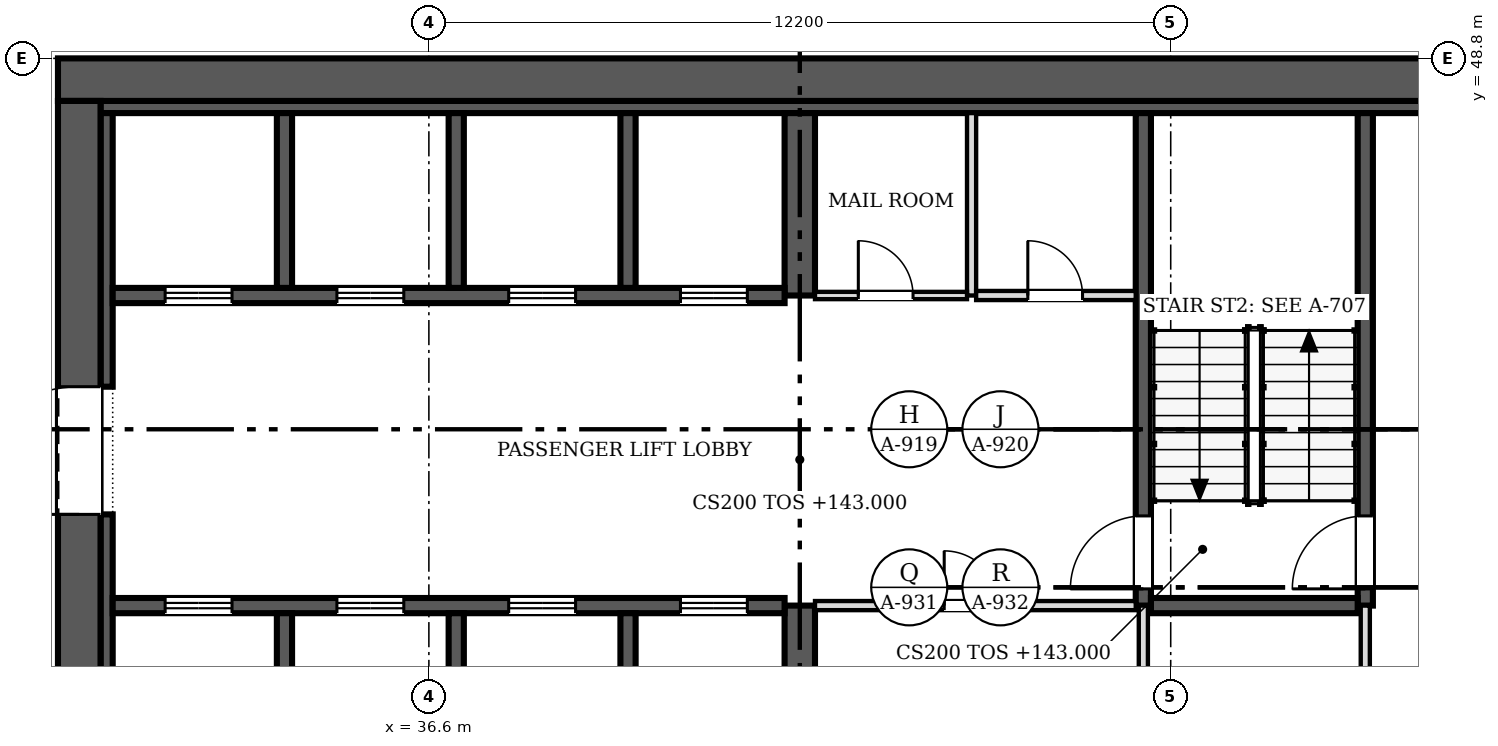
"""IFC4 building model, lengths in metres.
Left out: names, types, materials, properties, quantities, classifications, styles, units other than length and angle.
Written with IfcOpenShell. Run it as: python <this file> out.ifc"""

import sys

from ifc_helpers import new_model, si_unit, direction, frame, frame_2d, origin, place, context, subcontext, project, spatial, rectangle, extrude, source, transform, mapped, element, fill, save


model = new_model("IFC4")
c1 = context("Model", 3, precision=1e-05, world=origin(), true_north=direction((0.0, 1.0)))
c2 = subcontext(c1, "Body", "Model", "MODEL_VIEW")
j1 = project(units=[si_unit("LENGTHUNIT", "METRE"), si_unit("PLANEANGLEUNIT", "RADIAN")], contexts=[c1])
p1 = place(None, origin())
s1 = spatial("IfcSite", under=j1, at=p1, CompositionType="ELEMENT")
p2 = place(p1, origin())
s2 = spatial("IfcBuilding", under=s1, at=p2, CompositionType="ELEMENT")
p3 = place(p2, frame((0.0, 0.0, 143.0)))
s3 = spatial("IfcBuildingStorey", under=s2, at=p3, CompositionType="ELEMENT", Elevation=143.0)
p4 = place(p3, frame((30.85, 25.1, 0.0), z_axis=(0.0, 0.0, 1.0), x_axis=(0.0, 1.0, 0.0)))
e1 = element("IfcWall", 1, at=p4, inside=s3, PredefinedType="SHEAR", context=c2, shape_type="SweptSolid", body=[
    extrude(rectangle(XDim=23.0, YDim=0.7, at=frame_2d((11.5, 0.0))), origin(), (0.0, 0.0, 1.0), 3.8),
])
m1 = source(origin(), c2, "Body", "SweptSolid", [
    extrude(rectangle(XDim=2.1, YDim=2.4, at=frame_2d((1.05, 1.2))), frame((0.0, 0.36, 0.0), z_axis=(0.0, -1.0, 0.0), x_axis=(1.0, 0.0, 0.0)), (0.0, 0.0, 1.0), 0.72),
])
p5 = place(p4, frame((4.7, 0.0, 0.0)))
e2 = element("IfcOpeningElement", 2, at=p5, cuts=e1, PredefinedType="OPENING", context=c2, shape_type="MappedRepresentation", body=[
    mapped(m1, transform((0.0, 0.0, 0.0), scale=1.0)),
])
p6 = place(p4, frame((16.2, 0.0, 0.0)))
e3 = element("IfcOpeningElement", 3, at=p6, cuts=e1, PredefinedType="OPENING", context=c2, shape_type="MappedRepresentation", body=[
    mapped(m1, transform((0.0, 0.0, 0.0), scale=1.0)),
])
p7 = place(p3, frame((30.5, 48.45, 0.0), z_axis=(0.0, 0.0, 1.0), x_axis=(1.0, 0.0, 0.0)))
e4 = element("IfcWall", 4, at=p7, inside=s3, PredefinedType="SHEAR", context=c2, shape_type="SweptSolid", body=[
    extrude(rectangle(XDim=24.4, YDim=0.7, at=frame_2d((12.2, 0.0))), origin(), (0.0, 0.0, 1.0), 3.8),
])
p8 = place(p3, frame((31.2, 48.0, 0.0), z_axis=(0.0, 0.0, 1.0), x_axis=(1.0, 0.0, 0.0)))
e5 = element("IfcWall", 5, at=p8, inside=s3, PredefinedType="SOLIDWALL", context=c2, shape_type="SweptSolid", body=[
    extrude(rectangle(XDim=23.0, YDim=0.2, at=frame_2d((11.5, 0.0))), origin(), (0.0, 0.0, 1.0), 3.8),
])
p9 = place(p3, frame((31.3, 31.9, 0.0), z_axis=(0.0, 0.0, 1.0), x_axis=(0.0, 1.0, 0.0)))
e6 = element("IfcWall", 6, at=p9, inside=s3, PredefinedType="SOLIDWALL", context=c2, shape_type="SweptSolid", body=[
    extrude(rectangle(XDim=9.4, YDim=0.2, at=frame_2d((4.7, 0.0))), origin(), (0.0, 0.0, 1.0), 3.8),
])
p10 = place(p3, frame((31.3, 43.4, 0.0), z_axis=(0.0, 0.0, 1.0), x_axis=(0.0, 1.0, 0.0)))
e7 = element("IfcWall", 7, at=p10, inside=s3, PredefinedType="SOLIDWALL", context=c2, shape_type="SweptSolid", body=[
    extrude(rectangle(XDim=4.5, YDim=0.2, at=frame_2d((2.25, 0.0))), origin(), (0.0, 0.0, 1.0), 3.8),
])
p11 = place(p3, frame((42.7, 36.85, 0.0), z_axis=(0.0, 0.0, 1.0), x_axis=(0.0, 1.0, 0.0)))
e8 = element("IfcWall", 8, at=p11, inside=s3, PredefinedType="SHEAR", context=c2, shape_type="SweptSolid", body=[
    extrude(rectangle(XDim=2.95, YDim=0.5, at=frame_2d((1.475, 0.0))), origin(), (0.0, 0.0, 1.0), 3.8),
])
p12 = place(p3, frame((42.7, 44.9, 0.0), z_axis=(0.0, 0.0, 1.0), x_axis=(0.0, 1.0, 0.0)))
e9 = element("IfcWall", 9, at=p12, inside=s3, PredefinedType="SHEAR", context=c2, shape_type="SweptSolid", body=[
    extrude(rectangle(XDim=3.0, YDim=0.5, at=frame_2d((1.5, 0.0))), origin(), (0.0, 0.0, 1.0), 3.8),
])
p13 = place(p3, frame((31.4, 39.8, 0.0), z_axis=(0.0, 0.0, 1.0), x_axis=(1.0, 0.0, 0.0)))
e10 = element("IfcWall", 10, at=p13, inside=s3, PredefinedType="SOLIDWALL", context=c2, shape_type="SweptSolid", body=[
    extrude(rectangle(XDim=11.05, YDim=0.25, at=frame_2d((5.525, 0.0))), origin(), (0.0, 0.0, 1.0), 3.8),
])
m2 = source(origin(), c2, "Body", "SweptSolid", [
    extrude(rectangle(XDim=1.1, YDim=2.1, at=frame_2d((0.55, 1.05))), frame((0.0, 0.135, 0.0), z_axis=(0.0, -1.0, 0.0), x_axis=(1.0, 0.0, 0.0)), (0.0, 0.0, 1.0), 0.27),
])
p14 = place(p13, frame((0.863, 0.0, 0.0)))
e11 = element("IfcOpeningElement", 11, at=p14, cuts=e10, PredefinedType="OPENING", context=c2, shape_type="MappedRepresentation", body=[
    mapped(m2, transform((0.0, 0.0, 0.0), scale=1.0)),
])
p15 = place(p13, frame((3.688, 0.0, 0.0)))
e12 = element("IfcOpeningElement", 12, at=p15, cuts=e10, PredefinedType="OPENING", context=c2, shape_type="MappedRepresentation", body=[
    mapped(m2, transform((0.0, 0.0, 0.0), scale=1.0)),
])
p16 = place(p13, frame((6.512, 0.0, 0.0)))
e13 = element("IfcOpeningElement", 13, at=p16, cuts=e10, PredefinedType="OPENING", context=c2, shape_type="MappedRepresentation", body=[
    mapped(m2, transform((0.0, 0.0, 0.0), scale=1.0)),
])
p17 = place(p13, frame((9.337, 0.0, 0.0)))
e14 = element("IfcOpeningElement", 14, at=p17, cuts=e10, PredefinedType="OPENING", context=c2, shape_type="MappedRepresentation", body=[
    mapped(m2, transform((0.0, 0.0, 0.0), scale=1.0)),
])
p18 = place(p3, frame((42.45, 44.9, 0.0), z_axis=(0.0, 0.0, 1.0), x_axis=(-1.0, 0.0, 0.0)))
e15 = element("IfcWall", 15, at=p18, inside=s3, PredefinedType="SOLIDWALL", context=c2, shape_type="SweptSolid", body=[
    extrude(rectangle(XDim=11.05, YDim=0.25, at=frame_2d((5.525, 0.0))), origin(), (0.0, 0.0, 1.0), 3.8),
])
p19 = place(p18, frame((9.087, 0.0, 0.0)))
e16 = element("IfcOpeningElement", 16, at=p19, cuts=e15, PredefinedType="OPENING", context=c2, shape_type="MappedRepresentation", body=[
    mapped(m2, transform((0.0, 0.0, 0.0), scale=1.0)),
])
p20 = place(p18, frame((6.262, 0.0, 0.0)))
e17 = element("IfcOpeningElement", 17, at=p20, cuts=e15, PredefinedType="OPENING", context=c2, shape_type="MappedRepresentation", body=[
    mapped(m2, transform((0.0, 0.0, 0.0), scale=1.0)),
])
p21 = place(p18, frame((3.438, 0.0, 0.0)))
e18 = element("IfcOpeningElement", 18, at=p21, cuts=e15, PredefinedType="OPENING", context=c2, shape_type="MappedRepresentation", body=[
    mapped(m2, transform((0.0, 0.0, 0.0), scale=1.0)),
])
p22 = place(p18, frame((0.613, 0.0, 0.0)))
e19 = element("IfcOpeningElement", 19, at=p22, cuts=e15, PredefinedType="OPENING", context=c2, shape_type="MappedRepresentation", body=[
    mapped(m2, transform((0.0, 0.0, 0.0), scale=1.0)),
])
p23 = place(p3, frame((48.35, 47.9, 0.0), z_axis=(0.0, 0.0, 1.0), x_axis=(0.0, -1.0, 0.0)))
e20 = element("IfcWall", 20, at=p23, inside=s3, PredefinedType="SOLIDWALL", context=c2, shape_type="SweptSolid", body=[
    extrude(rectangle(XDim=8.1, YDim=0.25, at=frame_2d((4.05, 0.0))), origin(), (0.0, 0.0, 1.0), 3.8),
])
m3 = source(origin(), c2, "Body", "SweptSolid", [
    extrude(rectangle(XDim=1.2, YDim=2.1, at=frame_2d((0.6, 1.05))), frame((0.0, 0.135, 0.0), z_axis=(0.0, -1.0, 0.0), x_axis=(1.0, 0.0, 0.0)), (0.0, 0.0, 1.0), 0.27),
])
p24 = place(p23, frame((6.625, 0.0, 0.0)))
e21 = element("IfcOpeningElement", 21, at=p24, cuts=e20, PredefinedType="OPENING", context=c2, shape_type="MappedRepresentation", body=[
    mapped(m3, transform((0.0, 0.0, 0.0), scale=1.0)),
])
p25 = place(p3, frame((52.0, 39.8, 0.0), z_axis=(0.0, 0.0, 1.0), x_axis=(0.0, 1.0, 0.0)))
e22 = element("IfcWall", 22, at=p25, inside=s3, PredefinedType="SOLIDWALL", context=c2, shape_type="SweptSolid", body=[
    extrude(rectangle(XDim=8.1, YDim=0.25, at=frame_2d((4.05, 0.0))), origin(), (0.0, 0.0, 1.0), 3.8),
])
p26 = place(p25, frame((0.275, 0.0, 0.0)))
e23 = element("IfcOpeningElement", 23, at=p26, cuts=e22, PredefinedType="OPENING", context=c2, shape_type="MappedRepresentation", body=[
    mapped(m3, transform((0.0, 0.0, 0.0), scale=1.0)),
])
p27 = place(p3, frame((48.475, 39.8, 0.0), z_axis=(0.0, 0.0, 1.0), x_axis=(1.0, 0.0, 0.0)))
e24 = element("IfcWall", 24, at=p27, inside=s3, PredefinedType="SOLIDWALL", context=c2, shape_type="SweptSolid", body=[
    extrude(rectangle(XDim=3.4, YDim=0.25, at=frame_2d((1.7, 0.0))), origin(), (0.0, 0.0, 1.0), 3.8),
])
for number, where, z_axis, x_axis in (
    (25, (34.225, 36.85, 0.0), (0.0, 0.0, 1.0), (0.0, 1.0, 0.0)),
    (26, (37.05, 36.85, 0.0), (0.0, 0.0, 1.0), (0.0, 1.0, 0.0)),
    (27, (39.875, 36.85, 0.0), (0.0, 0.0, 1.0), (0.0, 1.0, 0.0)),
):
    element("IfcWall", number, at=place(p3, frame(where, z_axis=z_axis, x_axis=x_axis)), inside=s3, PredefinedType="SOLIDWALL", context=c2, shape_type="SweptSolid", body=[
        extrude(rectangle(XDim=2.825, YDim=0.25, at=frame_2d((1.413, 0.0))), origin(), (0.0, 0.0, 1.0), 3.8),
    ])
for number, where, z_axis, x_axis in (
    (28, (34.225, 45.025, 0.0), (0.0, 0.0, 1.0), (0.0, 1.0, 0.0)),
    (29, (37.05, 45.025, 0.0), (0.0, 0.0, 1.0), (0.0, 1.0, 0.0)),
    (30, (39.875, 45.025, 0.0), (0.0, 0.0, 1.0), (0.0, 1.0, 0.0)),
):
    element("IfcWall", number, at=place(p3, frame(where, z_axis=z_axis, x_axis=x_axis)), inside=s3, PredefinedType="SOLIDWALL", context=c2, shape_type="SweptSolid", body=[
        extrude(rectangle(XDim=2.875, YDim=0.25, at=frame_2d((1.438, 0.0))), origin(), (0.0, 0.0, 1.0), 3.8),
    ])
p28 = place(p3, frame((52.0, 33.525, 0.0), z_axis=(0.0, 0.0, 1.0), x_axis=(0.0, 1.0, 0.0)))
e31 = element("IfcWall", 31, at=p28, inside=s3, PredefinedType="PARTITIONING", context=c2, shape_type="SweptSolid", body=[
    extrude(rectangle(XDim=6.275, YDim=0.15, at=frame_2d((3.138, 0.0))), origin(), (0.0, 0.0, 1.0), 3.6),
])
m4 = source(origin(), c2, "Body", "SweptSolid", [
    extrude(rectangle(XDim=0.9, YDim=2.1, at=frame_2d((0.45, 1.05))), frame((0.0, 0.085, 0.0), z_axis=(0.0, -1.0, 0.0), x_axis=(1.0, 0.0, 0.0)), (0.0, 0.0, 1.0), 0.17),
])
p29 = place(p28, frame((1.025, 0.0, 0.0)))
e32 = element("IfcOpeningElement", 32, at=p29, cuts=e31, PredefinedType="OPENING", context=c2, shape_type="MappedRepresentation", body=[
    mapped(m4, transform((0.0, 0.0, 0.0), scale=1.0)),
])
p30 = place(p3, frame((48.225, 39.8, 0.0), z_axis=(0.0, 0.0, 1.0), x_axis=(-1.0, 0.0, 0.0)))
e33 = element("IfcWall", 33, at=p30, inside=s3, PredefinedType="PARTITIONING", context=c2, shape_type="SweptSolid", body=[
    extrude(rectangle(XDim=5.275, YDim=0.15, at=frame_2d((2.638, 0.0))), origin(), (0.0, 0.0, 1.0), 3.6),
])
p31 = place(p30, frame((2.25, 0.0, 0.0)))
e34 = element("IfcOpeningElement", 34, at=p31, cuts=e33, PredefinedType="OPENING", context=c2, shape_type="MappedRepresentation", body=[
    mapped(m4, transform((0.0, 0.0, 0.0), scale=1.0)),
])
p32 = place(p3, frame((48.35, 36.85, 0.0), z_axis=(0.0, 0.0, 1.0), x_axis=(0.0, 1.0, 0.0)))
e35 = element("IfcWall", 35, at=p32, inside=s3, PredefinedType="PARTITIONING", context=c2, shape_type="SweptSolid", body=[
    extrude(rectangle(XDim=2.95, YDim=0.15, at=frame_2d((1.475, 0.0))), origin(), (0.0, 0.0, 1.0), 3.6),
])
p33 = place(p3, frame((45.525, 44.9, 0.0), z_axis=(0.0, 0.0, 1.0), x_axis=(0.0, 1.0, 0.0)))
e36 = element("IfcWall", 36, at=p33, inside=s3, PredefinedType="PARTITIONING", context=c2, shape_type="SweptSolid", body=[
    extrude(rectangle(XDim=3.0, YDim=0.15, at=frame_2d((1.5, 0.0))), origin(), (0.0, 0.0, 1.0), 3.6),
])
p34 = place(p3, frame((42.95, 44.9, 0.0), z_axis=(0.0, 0.0, 1.0), x_axis=(1.0, 0.0, 0.0)))
e37 = element("IfcWall", 37, at=p34, inside=s3, PredefinedType="PARTITIONING", context=c2, shape_type="SweptSolid", body=[
    extrude(rectangle(XDim=2.5, YDim=0.12, at=frame_2d((1.25, 0.0))), origin(), (0.0, 0.0, 1.0), 3.6),
])
m5 = source(origin(), c2, "Body", "SweptSolid", [
    extrude(rectangle(XDim=0.9, YDim=2.1, at=frame_2d((0.45, 1.05))), frame((0.0, 0.07, 0.0), z_axis=(0.0, -1.0, 0.0), x_axis=(1.0, 0.0, 0.0)), (0.0, 0.0, 1.0), 0.14),
])
p35 = place(p34, frame((0.712, 0.0, 0.0)))
e38 = element("IfcOpeningElement", 38, at=p35, cuts=e37, PredefinedType="OPENING", context=c2, shape_type="MappedRepresentation", body=[
    mapped(m5, transform((0.0, 0.0, 0.0), scale=1.0)),
])
p36 = place(p3, frame((45.6, 44.9, 0.0), z_axis=(0.0, 0.0, 1.0), x_axis=(1.0, 0.0, 0.0)))
e39 = element("IfcWall", 39, at=p36, inside=s3, PredefinedType="PARTITIONING", context=c2, shape_type="SweptSolid", body=[
    extrude(rectangle(XDim=2.625, YDim=0.15, at=frame_2d((1.312, 0.0))), origin(), (0.0, 0.0, 1.0), 3.6),
])
p37 = place(p36, frame((0.85, 0.0, 0.0)))
e40 = element("IfcOpeningElement", 40, at=p37, cuts=e39, PredefinedType="OPENING", context=c2, shape_type="MappedRepresentation", body=[
    mapped(m4, transform((0.0, 0.0, 0.0), scale=1.0)),
])
m6 = source(origin(), c2, "Body", "SweptSolid", [
    extrude(rectangle(XDim=2.1, YDim=2.4, at=frame_2d((1.05, 1.2))), frame((0.0, 0.025, 0.0), z_axis=(0.0, -1.0, 0.0), x_axis=(1.0, 0.0, 0.0)), (0.0, 0.0, 1.0), 0.05),
])
p38 = place(p6, origin())
e41 = element("IfcDoor", 41, at=p38, inside=s3, OperationType="DOUBLE_DOOR_SINGLE_SWING", PredefinedType="DOOR", context=c2, shape_type="MappedRepresentation", body=[
    mapped(m6, transform((0.0, 0.0, 0.0), scale=1.0)),
])
fill(e3, e41)
m7 = source(origin(), c2, "Body", "SweptSolid", [
    extrude(rectangle(XDim=1.1, YDim=2.1, at=frame_2d((0.55, 1.05))), frame((0.0, 0.025, 0.0), z_axis=(0.0, -1.0, 0.0), x_axis=(1.0, 0.0, 0.0)), (0.0, 0.0, 1.0), 0.05),
])
p39 = place(p14, origin())
e42 = element("IfcDoor", 42, at=p39, inside=s3, OperationType="DOUBLE_DOOR_SLIDING", PredefinedType="DOOR", context=c2, shape_type="MappedRepresentation", body=[
    mapped(m7, transform((0.0, 0.0, 0.0), scale=1.0)),
])
fill(e11, e42)
p40 = place(p15, origin())
e43 = element("IfcDoor", 43, at=p40, inside=s3, OperationType="DOUBLE_DOOR_SLIDING", PredefinedType="DOOR", context=c2, shape_type="MappedRepresentation", body=[
    mapped(m7, transform((0.0, 0.0, 0.0), scale=1.0)),
])
fill(e12, e43)
p41 = place(p16, origin())
e44 = element("IfcDoor", 44, at=p41, inside=s3, OperationType="DOUBLE_DOOR_SLIDING", PredefinedType="DOOR", context=c2, shape_type="MappedRepresentation", body=[
    mapped(m7, transform((0.0, 0.0, 0.0), scale=1.0)),
])
fill(e13, e44)
p42 = place(p17, origin())
e45 = element("IfcDoor", 45, at=p42, inside=s3, OperationType="DOUBLE_DOOR_SLIDING", PredefinedType="DOOR", context=c2, shape_type="MappedRepresentation", body=[
    mapped(m7, transform((0.0, 0.0, 0.0), scale=1.0)),
])
fill(e14, e45)
p43 = place(p19, origin())
e46 = element("IfcDoor", 46, at=p43, inside=s3, OperationType="DOUBLE_DOOR_SLIDING", PredefinedType="DOOR", context=c2, shape_type="MappedRepresentation", body=[
    mapped(m7, transform((0.0, 0.0, 0.0), scale=1.0)),
])
fill(e16, e46)
p44 = place(p20, origin())
e47 = element("IfcDoor", 47, at=p44, inside=s3, OperationType="DOUBLE_DOOR_SLIDING", PredefinedType="DOOR", context=c2, shape_type="MappedRepresentation", body=[
    mapped(m7, transform((0.0, 0.0, 0.0), scale=1.0)),
])
fill(e17, e47)
p45 = place(p21, origin())
e48 = element("IfcDoor", 48, at=p45, inside=s3, OperationType="DOUBLE_DOOR_SLIDING", PredefinedType="DOOR", context=c2, shape_type="MappedRepresentation", body=[
    mapped(m7, transform((0.0, 0.0, 0.0), scale=1.0)),
])
fill(e18, e48)
p46 = place(p22, origin())
e49 = element("IfcDoor", 49, at=p46, inside=s3, OperationType="DOUBLE_DOOR_SLIDING", PredefinedType="DOOR", context=c2, shape_type="MappedRepresentation", body=[
    mapped(m7, transform((0.0, 0.0, 0.0), scale=1.0)),
])
fill(e19, e49)
m8 = source(origin(), c2, "Body", "SweptSolid", [
    extrude(rectangle(XDim=1.2, YDim=2.1, at=frame_2d((0.6, 1.05))), frame((0.0, 0.025, 0.0), z_axis=(0.0, -1.0, 0.0), x_axis=(1.0, 0.0, 0.0)), (0.0, 0.0, 1.0), 0.05),
])
p47 = place(p24, origin())
e50 = element("IfcDoor", 50, at=p47, inside=s3, OperationType="SINGLE_SWING_RIGHT", PredefinedType="DOOR", context=c2, shape_type="MappedRepresentation", body=[
    mapped(m8, transform((0.0, 0.0, 0.0), scale=1.0)),
])
fill(e21, e50)
p48 = place(p26, origin())
e51 = element("IfcDoor", 51, at=p48, inside=s3, OperationType="SINGLE_SWING_LEFT", PredefinedType="DOOR", context=c2, shape_type="MappedRepresentation", body=[
    mapped(m8, transform((0.0, 0.0, 0.0), scale=1.0)),
])
fill(e23, e51)
m9 = source(origin(), c2, "Body", "SweptSolid", [
    extrude(rectangle(XDim=0.9, YDim=2.1, at=frame_2d((0.45, 1.05))), frame((0.0, 0.025, 0.0), z_axis=(0.0, -1.0, 0.0), x_axis=(1.0, 0.0, 0.0)), (0.0, 0.0, 1.0), 0.05),
])
p49 = place(p31, origin())
e52 = element("IfcDoor", 52, at=p49, inside=s3, OperationType="SINGLE_SWING_RIGHT", PredefinedType="DOOR", context=c2, shape_type="MappedRepresentation", body=[
    mapped(m9, transform((0.0, 0.0, 0.0), scale=1.0)),
])
fill(e34, e52)
p50 = place(p35, origin())
e53 = element("IfcDoor", 53, at=p50, inside=s3, OperationType="SINGLE_SWING_LEFT", PredefinedType="DOOR", context=c2, shape_type="MappedRepresentation", body=[
    mapped(m9, transform((0.0, 0.0, 0.0), scale=1.0)),
])
fill(e38, e53)
p51 = place(p37, origin())
e54 = element("IfcDoor", 54, at=p51, inside=s3, OperationType="SINGLE_SWING_LEFT", PredefinedType="DOOR", context=c2, shape_type="MappedRepresentation", body=[
    mapped(m9, transform((0.0, 0.0, 0.0), scale=1.0)),
])
fill(e40, e54)
save(model, sys.argv[1])
